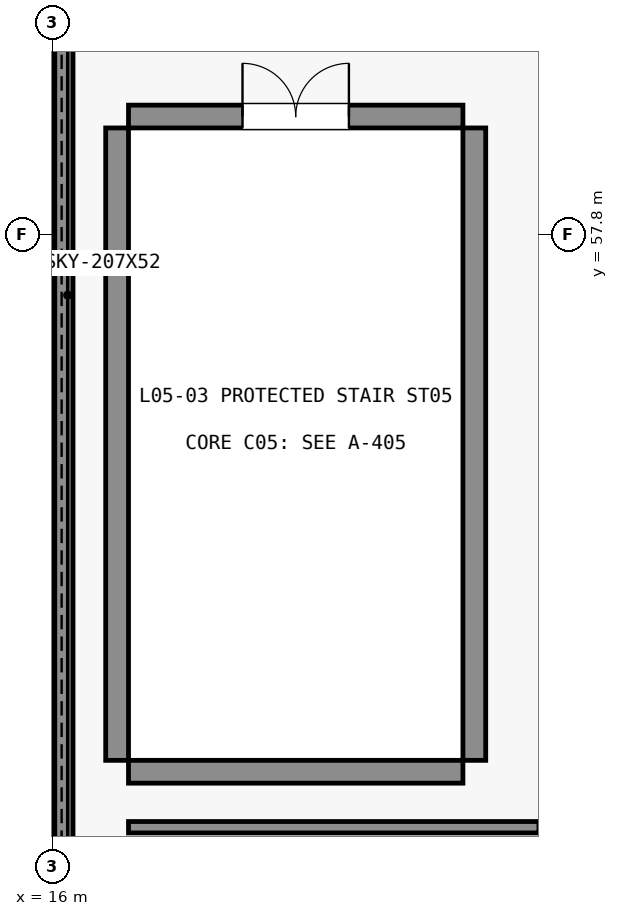
"""IFC4 building model, lengths in metres.
Left out: names, types, materials, properties, quantities, classifications, styles, units other than length and angle.
Written with IfcOpenShell. Run it as: python <this file> out.ifc"""

import sys

from ifc_helpers import new_model, si_unit, direction, frame, frame_2d, origin, place, context, subcontext, project, spatial, rectangle, extrude, element, fill, save


model = new_model("IFC4")
c1 = context("Model", 3, precision=1e-05, world=origin(), true_north=direction((0.0, 1.0)))
c2 = subcontext(c1, "Body", "Model", "MODEL_VIEW")
j1 = project(units=[si_unit("LENGTHUNIT", "METRE"), si_unit("PLANEANGLEUNIT", "RADIAN")], contexts=[c1])
p1 = place(None, origin())
s1 = spatial("IfcSite", under=j1, at=p1, CompositionType="ELEMENT")
p2 = place(p1, origin())
s2 = spatial("IfcBuilding", under=s1, at=p2, CompositionType="ELEMENT")
p3 = place(p2, frame((0.0, 0.0, 26.4)))
s3 = spatial("IfcBuildingStorey", under=s2, at=p3, CompositionType="ELEMENT", Elevation=26.4)
p4 = place(p3, frame((17.0, 50.73, 0.0), z_axis=(0.0, 0.0, 1.0), x_axis=(1.0, 0.0, 0.0)))
e1 = element("IfcWall", 1, at=p4, inside=s3, PredefinedType="SHEAR", context=c2, shape_type="SweptSolid", body=[
    extrude(rectangle(XDim=4.4, YDim=0.3, at=frame_2d((2.2, 0.0))), origin(), (0.0, 0.0, 1.0), 5.18),
])
p5 = place(p3, frame((17.0, 59.35, 0.0), z_axis=(0.0, 0.0, 1.0), x_axis=(1.0, 0.0, 0.0)))
e2 = element("IfcWall", 2, at=p5, inside=s3, PredefinedType="SHEAR", context=c2, shape_type="SweptSolid", body=[
    extrude(rectangle(XDim=4.4, YDim=0.3, at=frame_2d((2.2, 0.0))), origin(), (0.0, 0.0, 1.0), 5.18),
])
p6 = place(p5, frame((1.5, 0.0, 0.0)))
e3 = element("IfcOpeningElement", 3, at=p6, cuts=e2, PredefinedType="OPENING", context=c2, shape_type="SweptSolid", body=[
    extrude(rectangle(XDim=1.4, YDim=2.2, at=frame_2d((0.7, 1.1))), frame((0.0, 0.16, 0.0), z_axis=(0.0, -1.0, 0.0), x_axis=(1.0, 0.0, 0.0)), (0.0, 0.0, 1.0), 0.32),
])
for number, where, z_axis, x_axis in (
    (4, (16.85, 50.88, 0.0), (0.0, 0.0, 1.0), (0.0, 1.0, 0.0)),
    (5, (21.55, 50.88, 0.0), (0.0, 0.0, 1.0), (0.0, 1.0, 0.0)),
):
    element("IfcWall", number, at=place(p3, frame(where, z_axis=z_axis, x_axis=x_axis)), inside=s3, PredefinedType="SHEAR", context=c2, shape_type="SweptSolid", body=[
        extrude(rectangle(XDim=8.32, YDim=0.3, at=frame_2d((4.16, 0.0))), origin(), (0.0, 0.0, 1.0), 5.18),
    ])
p7 = place(p3, frame((16.15, 32.6, 5.4), z_axis=(0.0, 0.0, 1.0), x_axis=(0.0, 1.0, 0.0)))
e6 = element("IfcWall", 6, at=p7, inside=s3, PredefinedType="PARAPET", context=c2, shape_type="SweptSolid", body=[
    extrude(rectangle(XDim=63.0, YDim=0.24, at=frame_2d((31.5, 0.0))), origin(), (0.0, 0.0, 1.0), 1.0),
])
p8 = place(p3, frame((17.0, 50.0, 0.0), z_axis=(0.0, 0.0, 1.0), x_axis=(1.0, 0.0, 0.0)))
e7 = element("IfcWall", 7, at=p8, inside=s3, PredefinedType="STANDARD", context=c2, shape_type="SweptSolid", body=[
    extrude(rectangle(XDim=5.4, YDim=0.15, at=frame_2d((2.7, 0.0))), origin(), (0.0, 0.0, 1.0), 5.18),
])
p9 = place(p6, origin())
e8 = element("IfcDoor", 8, at=p9, inside=s3, OperationType="DOUBLE_DOOR_SINGLE_SWING", PredefinedType="DOOR", context=c2, shape_type="SweptSolid", body=[
    extrude(rectangle(XDim=1.4, YDim=2.2, at=frame_2d((0.7, 1.1))), frame((0.0, 0.025, 0.0), z_axis=(0.0, -1.0, 0.0), x_axis=(1.0, 0.0, 0.0)), (0.0, 0.0, 1.0), 0.05),
])
fill(e3, e8)
save(model, sys.argv[1])
